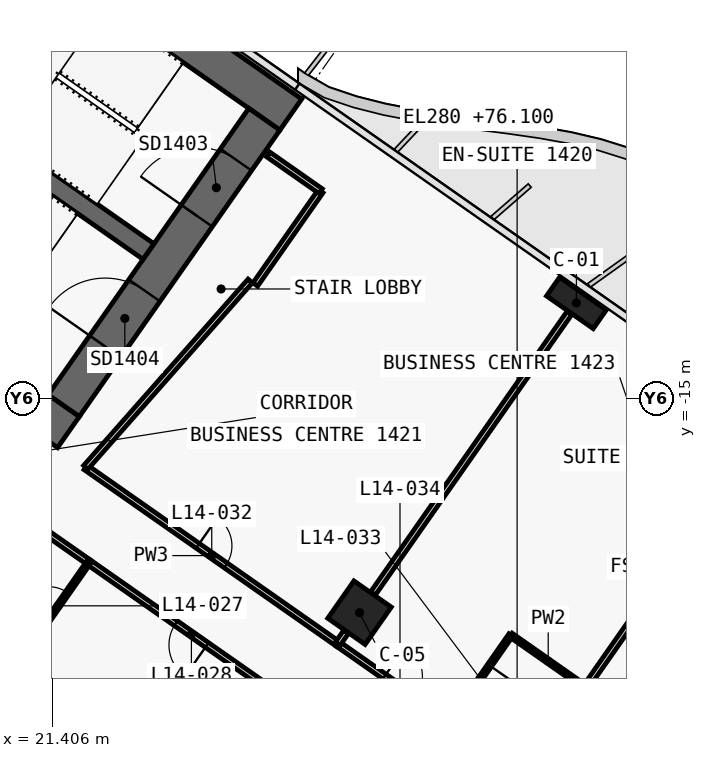
"""IFC4 building model, lengths in metres.
Left out: names, types, materials, properties, quantities, classifications, styles, units other than length and angle.
Written with IfcOpenShell. Run it as: python <this file> out.ifc"""

import sys

from ifc_helpers import new_model, si_unit, direction, frame, frame_2d, origin, origin_2d, place, context, subcontext, project, spatial, polyline, rectangle, outline, extrude, element, fill, save


model = new_model("IFC4")
c1 = context("Model", 3, precision=1e-05, world=origin(), true_north=direction((0.0, 1.0)))
c2 = subcontext(c1, "Body", "Model", "MODEL_VIEW")
j1 = project(units=[si_unit("LENGTHUNIT", "METRE"), si_unit("PLANEANGLEUNIT", "RADIAN")], contexts=[c1])
p1 = place(None, origin())
s1 = spatial("IfcSite", under=j1, at=p1, CompositionType="ELEMENT")
p2 = place(p1, origin())
s2 = spatial("IfcBuilding", under=s1, at=p2, CompositionType="ELEMENT")
p3 = place(p2, frame((0.0, 0.0, 76.1)))
s3 = spatial("IfcBuildingStorey", under=s2, at=p3, CompositionType="ELEMENT", Elevation=76.1)
p4 = place(p3, frame((-0.037, 11.867, 0.0), z_axis=(0.0, 0.0, 1.0), x_axis=(0.819155306259, -0.573571777746, 0.0)))
e1 = element("IfcWall", 1, at=p4, inside=s3, PredefinedType="SHEAR", context=c2, shape_type="SweptSolid", body=[
    extrude(outline(polyline([(33.837, 0.5), (0.0, 0.5), (0.7, -0.5), (33.837, -0.5), (33.837, 0.5)])), origin(), (0.0, 0.0, 1.0), 3.6),
])
p5 = place(p3, frame((-0.037, -0.585, 0.0), z_axis=(0.0, 0.0, 1.0), x_axis=(0.819157152511, -0.573569140985, 0.0)))
e2 = element("IfcWall", 2, at=p5, inside=s3, PredefinedType="SHEAR", context=c2, shape_type="SweptSolid", body=[
    extrude(outline(polyline([(26.695, 0.5), (0.0, 0.5), (0.7, -0.5), (26.695, -0.5), (26.695, 0.5)])), origin(), (0.0, 0.0, 1.0), 3.6),
])
p6 = place(p5, frame((6.695, 0.0, 0.0)))
e3 = element("IfcOpeningElement", 3, at=p6, cuts=e2, PredefinedType="OPENING", context=c2, shape_type="SweptSolid", body=[
    extrude(rectangle(XDim=1.5, YDim=2.1, at=frame_2d((0.75, 1.05))), frame((0.0, 0.51, 0.0), z_axis=(0.0, -1.0, 0.0), x_axis=(1.0, 0.0, 0.0)), (0.0, 0.0, 1.0), 1.02),
])
p7 = place(p5, frame((12.445, 0.0, 0.0)))
e4 = element("IfcOpeningElement", 4, at=p7, cuts=e2, PredefinedType="OPENING", context=c2, shape_type="SweptSolid", body=[
    extrude(rectangle(XDim=1.5, YDim=2.1, at=frame_2d((0.75, 1.05))), frame((0.0, 0.51, 0.0), z_axis=(0.0, -1.0, 0.0), x_axis=(1.0, 0.0, 0.0)), (0.0, 0.0, 1.0), 1.02),
])
p8 = place(p3, frame((21.708, -15.2, 0.0), z_axis=(0.0, 0.0, 1.0), x_axis=(0.573576324356, 0.819152122709, 0.0)))
e5 = element("IfcWall", 5, at=p8, inside=s3, PredefinedType="SHEAR", context=c2, shape_type="SweptSolid", body=[
    extrude(outline(polyline([(9.2, 0.5), (0.0, 0.5), (0.0, -0.5), (9.2, -0.5), (9.2, 0.5)])), origin(), (0.0, 0.0, 1.0), 3.6),
])
p9 = place(p8, frame((6.1, 0.0, 0.0)))
e6 = element("IfcOpeningElement", 6, at=p9, cuts=e5, PredefinedType="OPENING", context=c2, shape_type="SweptSolid", body=[
    extrude(rectangle(XDim=1.8, YDim=2.1, at=frame_2d((0.9, 1.05))), frame((0.0, 0.51, 0.0), z_axis=(0.0, -1.0, 0.0), x_axis=(1.0, 0.0, 0.0)), (0.0, 0.0, 1.0), 1.02),
])
p10 = place(p8, frame((1.9, 0.0, 0.0)))
e7 = element("IfcOpeningElement", 7, at=p10, cuts=e5, PredefinedType="OPENING", context=c2, shape_type="SweptSolid", body=[
    extrude(rectangle(XDim=1.8, YDim=2.1, at=frame_2d((0.9, 1.05))), frame((0.0, 0.51, 0.0), z_axis=(0.0, -1.0, 0.0), x_axis=(1.0, 0.0, 0.0)), (0.0, 0.0, 1.0), 1.02),
])
p11 = place(p3, frame((2.638, 3.768, 0.0), z_axis=(0.0, 0.0, 1.0), x_axis=(0.819148977158, -0.573580816643, 0.0)))
e8 = element("IfcWall", 8, at=p11, inside=s3, PredefinedType="SHEAR", context=c2, shape_type="SweptSolid", body=[
    extrude(outline(polyline([(0.0, 0.25), (0.0, -0.25), (26.0, -0.25), (26.0, 0.25), (0.0, 0.25)])), origin(), (0.0, 0.0, 1.0), 3.6),
])
p12 = place(p11, frame((9.637, 0.0, 0.0)))
e9 = element("IfcOpeningElement", 9, at=p12, cuts=e8, PredefinedType="OPENING", context=c2, shape_type="SweptSolid", body=[
    extrude(rectangle(XDim=1.2, YDim=2.1, at=frame_2d((0.6, 1.05))), frame((0.0, 0.26, 0.0), z_axis=(0.0, -1.0, 0.0), x_axis=(1.0, 0.0, 0.0)), (0.0, 0.0, 1.0), 0.52),
])
p13 = place(p11, frame((11.812, 0.0, 0.0)))
e10 = element("IfcOpeningElement", 10, at=p13, cuts=e8, PredefinedType="OPENING", context=c2, shape_type="SweptSolid", body=[
    extrude(rectangle(XDim=1.2, YDim=2.1, at=frame_2d((0.6, 1.05))), frame((0.0, 0.26, 0.0), z_axis=(0.0, -1.0, 0.0), x_axis=(1.0, 0.0, 0.0)), (0.0, 0.0, 1.0), 0.52),
])
p14 = place(p11, frame((13.988, 0.0, 0.0)))
e11 = element("IfcOpeningElement", 11, at=p14, cuts=e8, PredefinedType="OPENING", context=c2, shape_type="SweptSolid", body=[
    extrude(rectangle(XDim=1.2, YDim=2.1, at=frame_2d((0.6, 1.05))), frame((0.0, 0.26, 0.0), z_axis=(0.0, -1.0, 0.0), x_axis=(1.0, 0.0, 0.0)), (0.0, 0.0, 1.0), 0.52),
])
p15 = place(p11, frame((16.262, 0.0, 0.0)))
e12 = element("IfcOpeningElement", 12, at=p15, cuts=e8, PredefinedType="OPENING", context=c2, shape_type="SweptSolid", body=[
    extrude(rectangle(XDim=1.0, YDim=2.1, at=frame_2d((0.5, 1.05))), frame((0.0, 0.26, 0.0), z_axis=(0.0, -1.0, 0.0), x_axis=(1.0, 0.0, 0.0)), (0.0, 0.0, 1.0), 0.52),
])
p16 = place(p3, frame((35.197, -12.498, 0.0), z_axis=(0.0, 0.0, 1.0), x_axis=(0.819152044289, -0.573576436351, 0.0)))
e13 = element("IfcColumn", 13, at=p16, inside=s3, PredefinedType="COLUMN", context=c2, shape_type="SweptSolid", body=[
    extrude(rectangle(XDim=1.5, YDim=0.6, at=origin_2d()), origin(), (0.0, 0.0, 1.0), 3.6),
])
p17 = place(p3, frame((29.49, -20.649, 0.0), z_axis=(0.0, 0.0, 1.0), x_axis=(0.819152044289, -0.573576436351, 0.0)))
e14 = element("IfcColumn", 14, at=p17, inside=s3, PredefinedType="COLUMN", context=c2, shape_type="SweptSolid", body=[
    extrude(rectangle(XDim=1.2, YDim=1.2, at=origin_2d()), origin(), (0.0, 0.0, 1.0), 3.6),
])
p18 = place(p3, frame((22.284, -16.824, 0.0), z_axis=(0.0, 0.0, 1.0), x_axis=(0.819152599934, -0.573575642807, 0.0)))
e15 = element("IfcWall", 15, at=p18, inside=s3, PredefinedType="PARTITIONING", context=c2, shape_type="SweptSolid", body=[
    extrude(rectangle(XDim=8.098, YDim=0.15, at=frame_2d((4.049, 0.0))), origin(), (0.0, 0.0, 1.0), 2.6),
])
p19 = place(p18, frame((3.599, 0.0, 0.0)))
e16 = element("IfcOpeningElement", 16, at=p19, cuts=e15, PredefinedType="OPENING", context=c2, shape_type="SweptSolid", body=[
    extrude(rectangle(XDim=0.9, YDim=2.1, at=frame_2d((0.45, 1.05))), frame((0.0, 0.085, 0.0), z_axis=(0.0, -1.0, 0.0), x_axis=(1.0, 0.0, 0.0)), (0.0, 0.0, 1.0), 0.17),
])
p20 = place(p3, frame((28.914, -21.467, 0.0), z_axis=(0.0, 0.0, 1.0), x_axis=(0.819145961204, -0.573585123798, 0.0)))
e17 = element("IfcWall", 17, at=p20, inside=s3, PredefinedType="PARTITIONING", context=c2, shape_type="SweptSolid", body=[
    extrude(rectangle(XDim=3.603, YDim=0.15, at=frame_2d((1.802, 0.0))), origin(), (0.0, 0.0, 1.0), 2.6),
])
p21 = place(p20, frame((1.502, 0.0, 0.0)))
e18 = element("IfcOpeningElement", 18, at=p21, cuts=e17, PredefinedType="OPENING", context=c2, shape_type="SweptSolid", body=[
    extrude(rectangle(XDim=1.0, YDim=2.1, at=frame_2d((0.5, 1.05))), frame((0.0, 0.085, 0.0), z_axis=(0.0, -1.0, 0.0), x_axis=(1.0, 0.0, 0.0)), (0.0, 0.0, 1.0), 0.17),
])
p22 = place(p3, frame((27.771, -23.107, 0.0), z_axis=(0.0, 0.0, 1.0), x_axis=(-0.819153746897, 0.573574004767, 0.0)))
e19 = element("IfcWall", 19, at=p22, inside=s3, PredefinedType="PARTITIONING", context=c2, shape_type="SweptSolid", body=[
    extrude(rectangle(XDim=6.603, YDim=0.15, at=frame_2d((3.302, 0.0))), origin(), (0.0, 0.0, 1.0), 2.6),
])
p23 = place(p22, frame((2.802, 0.0, 0.0)))
e20 = element("IfcOpeningElement", 20, at=p23, cuts=e19, PredefinedType="OPENING", context=c2, shape_type="SweptSolid", body=[
    extrude(rectangle(XDim=1.0, YDim=2.1, at=frame_2d((0.5, 1.05))), frame((0.0, 0.085, 0.0), z_axis=(0.0, -1.0, 0.0), x_axis=(1.0, 0.0, 0.0)), (0.0, 0.0, 1.0), 0.17),
])
p24 = place(p3, frame((22.364, -19.322, 0.0), z_axis=(0.0, 0.0, 1.0), x_axis=(-0.819146032251, 0.573585022335, 0.0)))
e21 = element("IfcWall", 21, at=p24, inside=s3, PredefinedType="PARTITIONING", context=c2, shape_type="SweptSolid", body=[
    extrude(rectangle(XDim=2.404, YDim=0.15, at=frame_2d((1.202, 0.0))), origin(), (0.0, 0.0, 1.0), 2.6),
])
p25 = place(p3, frame((35.013, -12.76, 0.0), z_axis=(0.0, 0.0, 1.0), x_axis=(-0.573558725113, -0.819164445546, 0.0)))
e22 = element("IfcWall", 22, at=p25, inside=s3, PredefinedType="PARTITIONING", context=c2, shape_type="SweptSolid", body=[
    extrude(rectangle(XDim=9.01, YDim=0.15, at=frame_2d((4.505, 0.0))), origin(), (0.0, 0.0, 1.0), 2.6),
])
p26 = place(p3, frame((29.134, -21.156, 0.0), z_axis=(0.0, 0.0, 1.0), x_axis=(-0.572944929411, -0.819593867633, 0.0)))
e23 = element("IfcWall", 23, at=p26, inside=s3, PredefinedType="PARTITIONING", context=c2, shape_type="SweptSolid", body=[
    extrude(rectangle(XDim=0.38, YDim=0.15, at=frame_2d((0.19, 0.0))), origin(), (0.0, 0.0, 1.0), 2.6),
])
p27 = place(p3, frame((22.285, -16.825, 0.0), z_axis=(0.0, 0.0, 1.0), x_axis=(0.661551268245, 0.749899939647, 0.0)))
e24 = element("IfcWall", 24, at=p27, inside=s3, PredefinedType="PARTITIONING", context=c2, shape_type="SweptSolid", body=[
    extrude(rectangle(XDim=6.541, YDim=0.15, at=frame_2d((3.271, 0.0))), origin(), (0.0, 0.0, 1.0), 2.6),
])
p28 = place(p3, frame((26.746, -12.014, 0.0), z_axis=(0.0, 0.0, 1.0), x_axis=(0.573560650686, 0.819163097304, 0.0)))
e25 = element("IfcWall", 25, at=p28, inside=s3, PredefinedType="PARTITIONING", context=c2, shape_type="SweptSolid", body=[
    extrude(rectangle(XDim=3.0, YDim=0.15, at=frame_2d((1.5, 0.0))), origin(), (0.0, 0.0, 1.0), 3.32),
])
p29 = place(p3, frame((28.467, -9.556, 0.0), z_axis=(0.0, 0.0, 1.0), x_axis=(-0.819109000826, 0.573637903879, 0.0)))
e26 = element("IfcWall", 26, at=p29, inside=s3, PredefinedType="PARTITIONING", context=c2, shape_type="SweptSolid", body=[
    extrude(rectangle(XDim=1.68, YDim=0.15, at=frame_2d((0.84, 0.0))), origin(), (0.0, 0.0, 1.0), 3.32),
])
p30 = place(p3, frame((35.438, -22.615, 0.0), z_axis=(0.0, 0.0, 1.0), x_axis=(-0.819141114317, 0.573592045652, 0.0)))
e27 = element("IfcWall", 27, at=p30, inside=s3, PredefinedType="PARTITIONING", context=c2, shape_type="SweptSolid", body=[
    extrude(rectangle(XDim=2.4, YDim=0.12, at=frame_2d((1.2, 0.0))), origin(), (0.0, 0.0, 1.0), 3.32),
])
p31 = place(p3, frame((33.47, -21.239, 0.0), z_axis=(0.0, 0.0, 1.0), x_axis=(-0.573550118428, -0.819170471667, 0.0)))
e28 = element("IfcWall", 28, at=p31, inside=s3, PredefinedType="PARTITIONING", context=c2, shape_type="SweptSolid", body=[
    extrude(rectangle(XDim=2.8, YDim=0.12, at=frame_2d((1.4, 0.0))), origin(), (0.0, 0.0, 1.0), 2.6),
])
p32 = place(p31, frame((0.975, 0.0, 0.0)))
e29 = element("IfcOpeningElement", 29, at=p32, cuts=e28, PredefinedType="OPENING", context=c2, shape_type="SweptSolid", body=[
    extrude(rectangle(XDim=0.85, YDim=2.05, at=frame_2d((0.425, 1.025))), frame((0.0, 0.07, 0.0), z_axis=(0.0, -1.0, 0.0), x_axis=(1.0, 0.0, 0.0)), (0.0, 0.0, 1.0), 0.14),
])
p33 = place(p3, frame((38.708, -17.945, 0.0), z_axis=(0.0, 0.0, 1.0), x_axis=(-0.573568678046, -0.819157476658, 0.0)))
e30 = element("IfcWall", 30, at=p33, inside=s3, PredefinedType="PARTITIONING", context=c2, shape_type="SweptSolid", body=[
    extrude(rectangle(XDim=5.701, YDim=0.15, at=frame_2d((2.851, 0.0))), origin(), (0.0, 0.0, 1.0), 3.32),
])
p34 = place(p3, frame((20.757, -21.615, 0.0), z_axis=(0.0, 0.0, 1.0), x_axis=(0.57364959175, 0.819100815459, 0.0)))
e31 = element("IfcWall", 31, at=p34, inside=s3, PredefinedType="PARTITIONING", context=c2, shape_type="SweptSolid", body=[
    extrude(rectangle(XDim=2.8, YDim=0.12, at=frame_2d((1.4, 0.0))), origin(), (0.0, 0.0, 1.0), 3.32),
])
p35 = place(p34, frame((0.975, 0.0, 0.0)))
e32 = element("IfcOpeningElement", 32, at=p35, cuts=e31, PredefinedType="OPENING", context=c2, shape_type="SweptSolid", body=[
    extrude(rectangle(XDim=0.85, YDim=2.05, at=frame_2d((0.425, 1.025))), frame((0.0, 0.07, 0.0), z_axis=(0.0, -1.0, 0.0), x_axis=(1.0, 0.0, 0.0)), (0.0, 0.0, 1.0), 0.14),
])
p36 = place(p9, origin())
e33 = element("IfcDoor", 33, at=p36, inside=s3, OperationType="DOUBLE_DOOR_SINGLE_SWING", PredefinedType="DOOR", context=c2, shape_type="SweptSolid", body=[
    extrude(rectangle(XDim=1.8, YDim=2.1, at=frame_2d((0.9, 1.05))), frame((0.0, 0.025, 0.0), z_axis=(0.0, -1.0, 0.0), x_axis=(1.0, 0.0, 0.0)), (0.0, 0.0, 1.0), 0.05),
])
fill(e6, e33)
p37 = place(p10, origin())
e34 = element("IfcDoor", 34, at=p37, inside=s3, OperationType="DOUBLE_DOOR_SINGLE_SWING", PredefinedType="DOOR", context=c2, shape_type="SweptSolid", body=[
    extrude(rectangle(XDim=1.8, YDim=2.1, at=frame_2d((0.9, 1.05))), frame((0.0, 0.025, 0.0), z_axis=(0.0, -1.0, 0.0), x_axis=(1.0, 0.0, 0.0)), (0.0, 0.0, 1.0), 0.05),
])
fill(e7, e34)
p38 = place(p35, origin())
e35 = element("IfcDoor", 35, at=p38, inside=s3, OperationType="SINGLE_SWING_LEFT", PredefinedType="DOOR", context=c2, shape_type="SweptSolid", body=[
    extrude(rectangle(XDim=0.85, YDim=2.05, at=frame_2d((0.425, 1.025))), frame((0.0, 0.025, 0.0), z_axis=(0.0, -1.0, 0.0), x_axis=(1.0, 0.0, 0.0)), (0.0, 0.0, 1.0), 0.05),
])
fill(e32, e35)
p39 = place(p23, origin())
e36 = element("IfcDoor", 36, at=p39, inside=s3, OperationType="SINGLE_SWING_LEFT", PredefinedType="DOOR", context=c2, shape_type="SweptSolid", body=[
    extrude(rectangle(XDim=1.0, YDim=2.1, at=frame_2d((0.5, 1.05))), frame((0.0, 0.025, 0.0), z_axis=(0.0, -1.0, 0.0), x_axis=(1.0, 0.0, 0.0)), (0.0, 0.0, 1.0), 0.05),
])
fill(e20, e36)
p40 = place(p19, origin())
e37 = element("IfcDoor", 37, at=p40, inside=s3, OperationType="SINGLE_SWING_RIGHT", PredefinedType="DOOR", context=c2, shape_type="SweptSolid", body=[
    extrude(rectangle(XDim=0.9, YDim=2.1, at=frame_2d((0.45, 1.05))), frame((0.0, 0.025, 0.0), z_axis=(0.0, -1.0, 0.0), x_axis=(1.0, 0.0, 0.0)), (0.0, 0.0, 1.0), 0.05),
])
fill(e16, e37)
p41 = place(p32, origin())
e38 = element("IfcDoor", 38, at=p41, inside=s3, OperationType="SINGLE_SWING_LEFT", PredefinedType="DOOR", context=c2, shape_type="SweptSolid", body=[
    extrude(rectangle(XDim=0.85, YDim=2.05, at=frame_2d((0.425, 1.025))), frame((0.0, 0.025, 0.0), z_axis=(0.0, -1.0, 0.0), x_axis=(1.0, 0.0, 0.0)), (0.0, 0.0, 1.0), 0.05),
])
fill(e29, e38)
p42 = place(p21, origin())
e39 = element("IfcDoor", 39, at=p42, inside=s3, OperationType="SINGLE_SWING_RIGHT", PredefinedType="DOOR", context=c2, shape_type="SweptSolid", body=[
    extrude(rectangle(XDim=1.0, YDim=2.1, at=frame_2d((0.5, 1.05))), frame((0.0, 0.025, 0.0), z_axis=(0.0, -1.0, 0.0), x_axis=(1.0, 0.0, 0.0)), (0.0, 0.0, 1.0), 0.05),
])
fill(e18, e39)
save(model, sys.argv[1])
